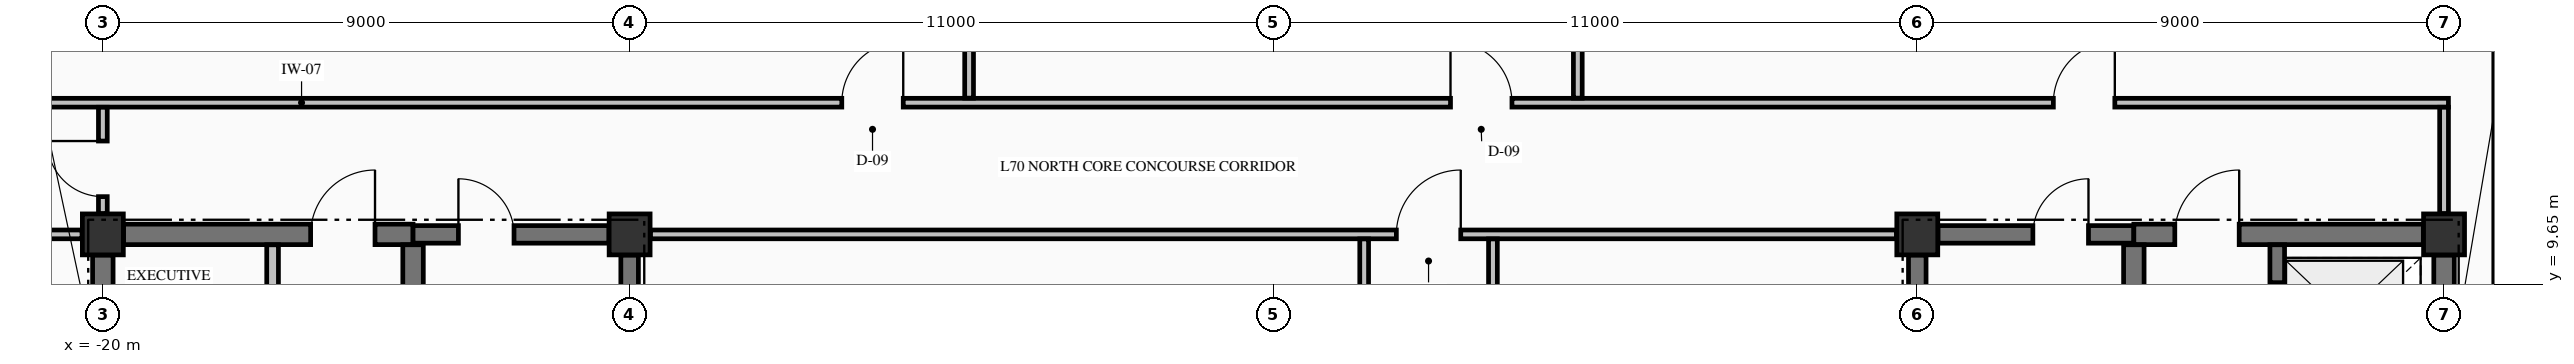
"""IFC4 building model, lengths in metres.
Left out: names, types, materials, properties, quantities, classifications, styles, units other than length and angle.
Written with IfcOpenShell. Run it as: python <this file> out.ifc"""

import sys

from ifc_helpers import new_model, si_unit, direction, frame, frame_2d, origin, origin_2d, place, context, subcontext, project, spatial, rectangle, extrude, element, fill, save


model = new_model("IFC4")
c1 = context("Model", 3, precision=1e-05, world=origin(), true_north=direction((0.0, 1.0)))
c2 = subcontext(c1, "Body", "Model", "MODEL_VIEW")
j1 = project(units=[si_unit("LENGTHUNIT", "METRE"), si_unit("PLANEANGLEUNIT", "RADIAN")], contexts=[c1])
p1 = place(None, origin())
s1 = spatial("IfcSite", under=j1, at=p1, CompositionType="ELEMENT")
p2 = place(p1, origin())
s2 = spatial("IfcBuilding", under=s1, at=p2, CompositionType="ELEMENT")
p3 = place(p2, frame((0.0, 0.0, 264.12)))
s3 = spatial("IfcBuildingStorey", under=s2, at=p3, CompositionType="ELEMENT", Elevation=264.12)
for number, where, z_axis, x_axis in (
    (1, (-20.0, 10.5, -0.25), (0.0, 0.0, 1.0), (1.0, 0.0, 0.0)),
    (2, (-11.0, 10.5, -0.25), (0.0, 0.0, 1.0), (1.0, 0.0, 0.0)),
    (3, (11.0, 10.5, -0.25), (0.0, 0.0, 1.0), (1.0, 0.0, 0.0)),
    (4, (20.0, 10.5, -0.25), (0.0, 0.0, 1.0), (1.0, 0.0, 0.0)),
):
    element("IfcColumn", number, at=place(p3, frame(where, z_axis=z_axis, x_axis=x_axis)), inside=s3, PredefinedType="COLUMN", context=c2, shape_type="SweptSolid", body=[
        extrude(rectangle(XDim=0.7, YDim=0.7, at=origin_2d()), origin(), (0.0, 0.0, 1.0), 3.23),
    ])
p4 = place(p3, frame((21.0, 9.455, 0.0), z_axis=(0.0, 0.0, 1.0), x_axis=(0.0, 1.0, 0.0)))
e5 = element("IfcWall", 5, at=p4, inside=s3, PredefinedType="STANDARD", context=c2, shape_type="SweptSolid", body=[
    extrude(rectangle(XDim=8.09, YDim=0.3, at=frame_2d((4.045, 0.0))), origin(), (0.0, 0.0, 1.0), 2.372),
])
p5 = place(p3, frame((-19.646, 10.5, 0.0), z_axis=(0.0, 0.0, 1.0), x_axis=(1.0, 0.0, 0.0)))
e6 = element("IfcWall", 6, at=p5, inside=s3, PredefinedType="SHEAR", context=c2, shape_type="SweptSolid", body=[
    extrude(rectangle(XDim=4.946, YDim=0.35, at=frame_2d((2.473, 0.0))), origin(), (0.0, 0.0, 1.0), 2.98),
])
p6 = place(p5, frame((3.196, 0.0, 0.0)))
e7 = element("IfcOpeningElement", 7, at=p6, cuts=e6, PredefinedType="OPENING", context=c2, shape_type="SweptSolid", body=[
    extrude(rectangle(XDim=1.1, YDim=2.15, at=frame_2d((0.55, 1.075))), frame((0.0, 0.185, 0.0), z_axis=(0.0, -1.0, 0.0), x_axis=(1.0, 0.0, 0.0)), (0.0, 0.0, 1.0), 0.37),
])
p7 = place(p3, frame((-14.7, 10.5, 0.0), z_axis=(0.0, 0.0, 1.0), x_axis=(1.0, 0.0, 0.0)))
e8 = element("IfcWall", 8, at=p7, inside=s3, PredefinedType="SHEAR", context=c2, shape_type="SweptSolid", body=[
    extrude(rectangle(XDim=3.346, YDim=0.3, at=frame_2d((1.673, 0.0))), origin(), (0.0, 0.0, 1.0), 2.98),
])
p8 = place(p7, frame((0.775, 0.0, 0.0)))
e9 = element("IfcOpeningElement", 9, at=p8, cuts=e8, PredefinedType="OPENING", context=c2, shape_type="SweptSolid", body=[
    extrude(rectangle(XDim=0.95, YDim=2.15, at=frame_2d((0.475, 1.075))), frame((0.0, 0.16, 0.0), z_axis=(0.0, -1.0, 0.0), x_axis=(1.0, 0.0, 0.0)), (0.0, 0.0, 1.0), 0.32),
])
p9 = place(p3, frame((11.354, 10.5, 0.0), z_axis=(0.0, 0.0, 1.0), x_axis=(1.0, 0.0, 0.0)))
e10 = element("IfcWall", 10, at=p9, inside=s3, PredefinedType="SHEAR", context=c2, shape_type="SweptSolid", body=[
    extrude(rectangle(XDim=3.346, YDim=0.3, at=frame_2d((1.673, 0.0))), origin(), (0.0, 0.0, 1.0), 2.98),
])
p10 = place(p9, frame((1.621, 0.0, 0.0)))
e11 = element("IfcOpeningElement", 11, at=p10, cuts=e10, PredefinedType="OPENING", context=c2, shape_type="SweptSolid", body=[
    extrude(rectangle(XDim=0.95, YDim=2.15, at=frame_2d((0.475, 1.075))), frame((0.0, 0.16, 0.0), z_axis=(0.0, -1.0, 0.0), x_axis=(1.0, 0.0, 0.0)), (0.0, 0.0, 1.0), 0.32),
])
p11 = place(p3, frame((14.7, 10.5, 0.0), z_axis=(0.0, 0.0, 1.0), x_axis=(1.0, 0.0, 0.0)))
e12 = element("IfcWall", 12, at=p11, inside=s3, PredefinedType="SHEAR", context=c2, shape_type="SweptSolid", body=[
    extrude(rectangle(XDim=4.946, YDim=0.35, at=frame_2d((2.473, 0.0))), origin(), (0.0, 0.0, 1.0), 2.98),
])
p12 = place(p11, frame((0.7, 0.0, 0.0)))
e13 = element("IfcOpeningElement", 13, at=p12, cuts=e12, PredefinedType="OPENING", context=c2, shape_type="SweptSolid", body=[
    extrude(rectangle(XDim=1.1, YDim=2.15, at=frame_2d((0.55, 1.075))), frame((0.0, 0.185, 0.0), z_axis=(0.0, -1.0, 0.0), x_axis=(1.0, 0.0, 0.0)), (0.0, 0.0, 1.0), 0.37),
])
p13 = place(p3, frame((-25.835, 10.5, 0.0), z_axis=(0.0, 0.0, 1.0), x_axis=(1.0, 0.0, 0.0)))
e14 = element("IfcWall", 14, at=p13, inside=s3, PredefinedType="PARTITIONING", context=c2, shape_type="SweptSolid", body=[
    extrude(rectangle(XDim=5.479, YDim=0.15, at=frame_2d((2.74, 0.0))), origin(), (0.0, 0.0, 1.0), 2.98),
])
p14 = place(p13, frame((2.36, 0.0, 0.0)))
e15 = element("IfcOpeningElement", 15, at=p14, cuts=e14, PredefinedType="OPENING", context=c2, shape_type="SweptSolid", body=[
    extrude(rectangle(XDim=0.95, YDim=2.15, at=frame_2d((0.475, 1.075))), frame((0.0, 0.085, 0.0), z_axis=(0.0, -1.0, 0.0), x_axis=(1.0, 0.0, 0.0)), (0.0, 0.0, 1.0), 0.17),
])
p15 = place(p3, frame((-10.644, 10.5, 0.0), z_axis=(0.0, 0.0, 1.0), x_axis=(1.0, 0.0, 0.0)))
e16 = element("IfcWall", 16, at=p15, inside=s3, PredefinedType="PARTITIONING", context=c2, shape_type="SweptSolid", body=[
    extrude(rectangle(XDim=21.288, YDim=0.15, at=frame_2d((10.644, 0.0))), origin(), (0.0, 0.0, 1.0), 2.98),
])
p16 = place(p15, frame((12.744, 0.0, 0.0)))
e17 = element("IfcOpeningElement", 17, at=p16, cuts=e16, PredefinedType="OPENING", context=c2, shape_type="SweptSolid", body=[
    extrude(rectangle(XDim=1.1, YDim=2.15, at=frame_2d((0.55, 1.075))), frame((0.0, 0.085, 0.0), z_axis=(0.0, -1.0, 0.0), x_axis=(1.0, 0.0, 0.0)), (0.0, 0.0, 1.0), 0.17),
])
p17 = place(p3, frame((-25.835, 12.75, 0.0), z_axis=(0.0, 0.0, 1.0), x_axis=(1.0, 0.0, 0.0)))
e18 = element("IfcWall", 18, at=p17, inside=s3, PredefinedType="PARTITIONING", context=c2, shape_type="SweptSolid", body=[
    extrude(rectangle(XDim=45.91, YDim=0.15, at=frame_2d((22.955, 0.0))), origin(), (0.0, 0.0, 1.0), 2.98),
])
p18 = place(p17, frame((18.46, 0.0, 0.0)))
e19 = element("IfcOpeningElement", 19, at=p18, cuts=e18, PredefinedType="OPENING", context=c2, shape_type="SweptSolid", body=[
    extrude(rectangle(XDim=1.05, YDim=2.15, at=frame_2d((0.525, 1.075))), frame((0.0, 0.085, 0.0), z_axis=(0.0, -1.0, 0.0), x_axis=(1.0, 0.0, 0.0)), (0.0, 0.0, 1.0), 0.17),
])
p19 = place(p17, frame((28.86, 0.0, 0.0)))
e20 = element("IfcOpeningElement", 20, at=p19, cuts=e18, PredefinedType="OPENING", context=c2, shape_type="SweptSolid", body=[
    extrude(rectangle(XDim=1.05, YDim=2.15, at=frame_2d((0.525, 1.075))), frame((0.0, 0.085, 0.0), z_axis=(0.0, -1.0, 0.0), x_axis=(1.0, 0.0, 0.0)), (0.0, 0.0, 1.0), 0.17),
])
p20 = place(p17, frame((39.16, 0.0, 0.0)))
e21 = element("IfcOpeningElement", 21, at=p20, cuts=e18, PredefinedType="OPENING", context=c2, shape_type="SweptSolid", body=[
    extrude(rectangle(XDim=1.05, YDim=2.15, at=frame_2d((0.525, 1.075))), frame((0.0, 0.085, 0.0), z_axis=(0.0, -1.0, 0.0), x_axis=(1.0, 0.0, 0.0)), (0.0, 0.0, 1.0), 0.17),
])
p21 = place(p3, frame((-20.0, 5.327, 0.0), z_axis=(0.0, 0.0, 1.0), x_axis=(0.0, 1.0, 0.0)))
e22 = element("IfcWall", 22, at=p21, inside=s3, PredefinedType="SHEAR", context=c2, shape_type="SweptSolid", body=[
    extrude(rectangle(XDim=4.819, YDim=0.35, at=frame_2d((2.41, 0.0))), origin(), (0.0, 0.0, 1.0), 2.98),
])
p22 = place(p3, frame((-14.7, 5.852, 0.0), z_axis=(0.0, 0.0, 1.0), x_axis=(0.0, 1.0, 0.0)))
e23 = element("IfcWall", 23, at=p22, inside=s3, PredefinedType="SHEAR", context=c2, shape_type="SweptSolid", body=[
    extrude(rectangle(XDim=4.471, YDim=0.35, at=frame_2d((2.235, 0.0))), origin(), (0.0, 0.0, 1.0), 2.98),
])
for number, where, z_axis, x_axis in (
    (24, (-11.0, 5.852, 0.0), (0.0, 0.0, 1.0), (0.0, 1.0, 0.0)),
    (25, (11.0, 5.852, 0.0), (0.0, 0.0, 1.0), (0.0, 1.0, 0.0)),
):
    element("IfcWall", number, at=place(p3, frame(where, z_axis=z_axis, x_axis=x_axis)), inside=s3, PredefinedType="SHEAR", context=c2, shape_type="SweptSolid", body=[
        extrude(rectangle(XDim=4.294, YDim=0.3, at=frame_2d((2.147, 0.0))), origin(), (0.0, 0.0, 1.0), 2.98),
    ])
p23 = place(p3, frame((14.7, 5.852, 0.0), z_axis=(0.0, 0.0, 1.0), x_axis=(0.0, 1.0, 0.0)))
e26 = element("IfcWall", 26, at=p23, inside=s3, PredefinedType="SHEAR", context=c2, shape_type="SweptSolid", body=[
    extrude(rectangle(XDim=4.471, YDim=0.35, at=frame_2d((2.235, 0.0))), origin(), (0.0, 0.0, 1.0), 2.98),
])
p24 = place(p3, frame((17.15, 7.877, 0.0), z_axis=(0.0, 0.0, 1.0), x_axis=(0.0, 1.0, 0.0)))
e27 = element("IfcWall", 27, at=p24, inside=s3, PredefinedType="SOLIDWALL", context=c2, shape_type="SweptSolid", body=[
    extrude(rectangle(XDim=2.446, YDim=0.25, at=frame_2d((1.223, 0.0))), origin(), (0.0, 0.0, 1.0), 2.98),
])
p25 = place(p24, frame((0.698, 0.0, 0.0)))
e28 = element("IfcOpeningElement", 28, at=p25, cuts=e27, PredefinedType="OPENING", context=c2, shape_type="SweptSolid", body=[
    extrude(rectangle(XDim=1.1, YDim=2.2, at=frame_2d((0.55, 1.1))), frame((0.0, 0.135, 0.0), z_axis=(0.0, -1.0, 0.0), x_axis=(1.0, 0.0, 0.0)), (0.0, 0.0, 1.0), 0.27),
])
p26 = place(p3, frame((20.0, 7.877, 0.0), z_axis=(0.0, 0.0, 1.0), x_axis=(0.0, 1.0, 0.0)))
e29 = element("IfcWall", 29, at=p26, inside=s3, PredefinedType="SHEAR", context=c2, shape_type="SweptSolid", body=[
    extrude(rectangle(XDim=2.269, YDim=0.35, at=frame_2d((1.135, 0.0))), origin(), (0.0, 0.0, 1.0), 2.98),
])
p27 = place(p3, frame((-20.0, 10.856, 0.0), z_axis=(0.0, 0.0, 1.0), x_axis=(0.0, 1.0, 0.0)))
e30 = element("IfcWall", 30, at=p27, inside=s3, PredefinedType="PARTITIONING", context=c2, shape_type="SweptSolid", body=[
    extrude(rectangle(XDim=1.816, YDim=0.15, at=frame_2d((0.908, 0.0))), origin(), (0.0, 0.0, 1.0), 2.98),
])
p28 = place(p27, frame((0.289, 0.0, 0.0)))
e31 = element("IfcOpeningElement", 31, at=p28, cuts=e30, PredefinedType="OPENING", context=c2, shape_type="SweptSolid", body=[
    extrude(rectangle(XDim=0.95, YDim=2.15, at=frame_2d((0.475, 1.075))), frame((0.0, 0.085, 0.0), z_axis=(0.0, -1.0, 0.0), x_axis=(1.0, 0.0, 0.0)), (0.0, 0.0, 1.0), 0.17),
])
p29 = place(p3, frame((-17.1, 5.328, 0.0), z_axis=(0.0, 0.0, 1.0), x_axis=(0.0, 1.0, 0.0)))
e32 = element("IfcWall", 32, at=p29, inside=s3, PredefinedType="PARTITIONING", context=c2, shape_type="SweptSolid", body=[
    extrude(rectangle(XDim=4.994, YDim=0.2, at=frame_2d((2.497, 0.0))), origin(), (0.0, 0.0, 1.0), 2.98),
])
p30 = place(p29, frame((2.072, 0.0, 0.0)))
e33 = element("IfcOpeningElement", 33, at=p30, cuts=e32, PredefinedType="OPENING", context=c2, shape_type="SweptSolid", body=[
    extrude(rectangle(XDim=0.9, YDim=2.15, at=frame_2d((0.45, 1.075))), frame((0.0, 0.11, 0.0), z_axis=(0.0, -1.0, 0.0), x_axis=(1.0, 0.0, 0.0)), (0.0, 0.0, 1.0), 0.22),
])
p31 = place(p3, frame((-5.2, 12.828, 0.0), z_axis=(0.0, 0.0, 1.0), x_axis=(0.0, 1.0, 0.0)))
e34 = element("IfcWall", 34, at=p31, inside=s3, PredefinedType="PARTITIONING", context=c2, shape_type="SweptSolid", body=[
    extrude(rectangle(XDim=10.507, YDim=0.15, at=frame_2d((5.253, 0.0))), origin(), (0.0, 0.0, 1.0), 2.98),
])
for number, where, z_axis, x_axis in (
    (35, (1.55, 2.978, 0.0), (0.0, 0.0, 1.0), (0.0, 1.0, 0.0)),
    (36, (3.75, 2.978, 0.0), (0.0, 0.0, 1.0), (0.0, 1.0, 0.0)),
):
    element("IfcWall", number, at=place(p3, frame(where, z_axis=z_axis, x_axis=x_axis)), inside=s3, PredefinedType="PARTITIONING", context=c2, shape_type="SweptSolid", body=[
        extrude(rectangle(XDim=7.444, YDim=0.15, at=frame_2d((3.722, 0.0))), origin(), (0.0, 0.0, 1.0), 2.98),
    ])
p32 = place(p3, frame((5.2, 12.828, 0.0), z_axis=(0.0, 0.0, 1.0), x_axis=(0.0, 1.0, 0.0)))
e37 = element("IfcWall", 37, at=p32, inside=s3, PredefinedType="PARTITIONING", context=c2, shape_type="SweptSolid", body=[
    extrude(rectangle(XDim=10.507, YDim=0.15, at=frame_2d((5.253, 0.0))), origin(), (0.0, 0.0, 1.0), 2.98),
])
p33 = place(p3, frame((20.0, 10.856, 0.0), z_axis=(0.0, 0.0, 1.0), x_axis=(0.0, 1.0, 0.0)))
e38 = element("IfcWall", 38, at=p33, inside=s3, PredefinedType="PARTITIONING", context=c2, shape_type="SweptSolid", body=[
    extrude(rectangle(XDim=1.816, YDim=0.15, at=frame_2d((0.908, 0.0))), origin(), (0.0, 0.0, 1.0), 2.57),
])
p34 = place(p8, origin())
e39 = element("IfcDoor", 39, at=p34, inside=s3, OperationType="SINGLE_SWING_LEFT", PredefinedType="DOOR", context=c2, shape_type="SweptSolid", body=[
    extrude(rectangle(XDim=0.95, YDim=2.15, at=frame_2d((0.475, 1.075))), frame((0.0, 0.025, 0.0), z_axis=(0.0, -1.0, 0.0), x_axis=(1.0, 0.0, 0.0)), (0.0, 0.0, 1.0), 0.05),
])
fill(e9, e39)
p35 = place(p10, origin())
e40 = element("IfcDoor", 40, at=p35, inside=s3, OperationType="SINGLE_SWING_RIGHT", PredefinedType="DOOR", context=c2, shape_type="SweptSolid", body=[
    extrude(rectangle(XDim=0.95, YDim=2.15, at=frame_2d((0.475, 1.075))), frame((0.0, 0.025, 0.0), z_axis=(0.0, -1.0, 0.0), x_axis=(1.0, 0.0, 0.0)), (0.0, 0.0, 1.0), 0.05),
])
fill(e11, e40)
p36 = place(p6, origin())
e41 = element("IfcDoor", 41, at=p36, inside=s3, OperationType="SINGLE_SWING_RIGHT", PredefinedType="DOOR", context=c2, shape_type="SweptSolid", body=[
    extrude(rectangle(XDim=1.1, YDim=2.15, at=frame_2d((0.55, 1.075))), frame((0.0, 0.025, 0.0), z_axis=(0.0, -1.0, 0.0), x_axis=(1.0, 0.0, 0.0)), (0.0, 0.0, 1.0), 0.05),
])
fill(e7, e41)
p37 = place(p25, origin())
e42 = element("IfcDoor", 42, at=p37, inside=s3, OperationType="SLIDING_TO_RIGHT", PredefinedType="DOOR", context=c2, shape_type="SweptSolid", body=[
    extrude(rectangle(XDim=1.1, YDim=2.2, at=frame_2d((0.55, 1.1))), frame((0.0, 0.025, 0.0), z_axis=(0.0, -1.0, 0.0), x_axis=(1.0, 0.0, 0.0)), (0.0, 0.0, 1.0), 0.05),
])
fill(e28, e42)
p38 = place(p12, origin())
e43 = element("IfcDoor", 43, at=p38, inside=s3, OperationType="SINGLE_SWING_RIGHT", PredefinedType="DOOR", context=c2, shape_type="SweptSolid", body=[
    extrude(rectangle(XDim=1.1, YDim=2.15, at=frame_2d((0.55, 1.075))), frame((0.0, 0.025, 0.0), z_axis=(0.0, -1.0, 0.0), x_axis=(1.0, 0.0, 0.0)), (0.0, 0.0, 1.0), 0.05),
])
fill(e13, e43)
p39 = place(p16, origin())
e44 = element("IfcDoor", 44, at=p39, inside=s3, OperationType="SINGLE_SWING_RIGHT", PredefinedType="DOOR", context=c2, shape_type="SweptSolid", body=[
    extrude(rectangle(XDim=1.1, YDim=2.15, at=frame_2d((0.55, 1.075))), frame((0.0, 0.025, 0.0), z_axis=(0.0, -1.0, 0.0), x_axis=(1.0, 0.0, 0.0)), (0.0, 0.0, 1.0), 0.05),
])
fill(e17, e44)
p40 = place(p18, origin())
e45 = element("IfcDoor", 45, at=p40, inside=s3, OperationType="SINGLE_SWING_RIGHT", PredefinedType="DOOR", context=c2, shape_type="SweptSolid", body=[
    extrude(rectangle(XDim=1.05, YDim=2.15, at=frame_2d((0.525, 1.075))), frame((0.0, 0.025, 0.0), z_axis=(0.0, -1.0, 0.0), x_axis=(1.0, 0.0, 0.0)), (0.0, 0.0, 1.0), 0.05),
])
fill(e19, e45)
p41 = place(p19, origin())
e46 = element("IfcDoor", 46, at=p41, inside=s3, OperationType="SINGLE_SWING_LEFT", PredefinedType="DOOR", context=c2, shape_type="SweptSolid", body=[
    extrude(rectangle(XDim=1.05, YDim=2.15, at=frame_2d((0.525, 1.075))), frame((0.0, 0.025, 0.0), z_axis=(0.0, -1.0, 0.0), x_axis=(1.0, 0.0, 0.0)), (0.0, 0.0, 1.0), 0.05),
])
fill(e20, e46)
p42 = place(p20, origin())
e47 = element("IfcDoor", 47, at=p42, inside=s3, OperationType="SINGLE_SWING_RIGHT", PredefinedType="DOOR", context=c2, shape_type="SweptSolid", body=[
    extrude(rectangle(XDim=1.05, YDim=2.15, at=frame_2d((0.525, 1.075))), frame((0.0, 0.025, 0.0), z_axis=(0.0, -1.0, 0.0), x_axis=(1.0, 0.0, 0.0)), (0.0, 0.0, 1.0), 0.05),
])
fill(e21, e47)
p43 = place(p28, origin())
e48 = element("IfcDoor", 48, at=p43, inside=s3, OperationType="SINGLE_SWING_RIGHT", PredefinedType="DOOR", context=c2, shape_type="SweptSolid", body=[
    extrude(rectangle(XDim=0.95, YDim=2.15, at=frame_2d((0.475, 1.075))), frame((0.0, 0.025, 0.0), z_axis=(0.0, -1.0, 0.0), x_axis=(1.0, 0.0, 0.0)), (0.0, 0.0, 1.0), 0.05),
])
fill(e31, e48)
save(model, sys.argv[1])
